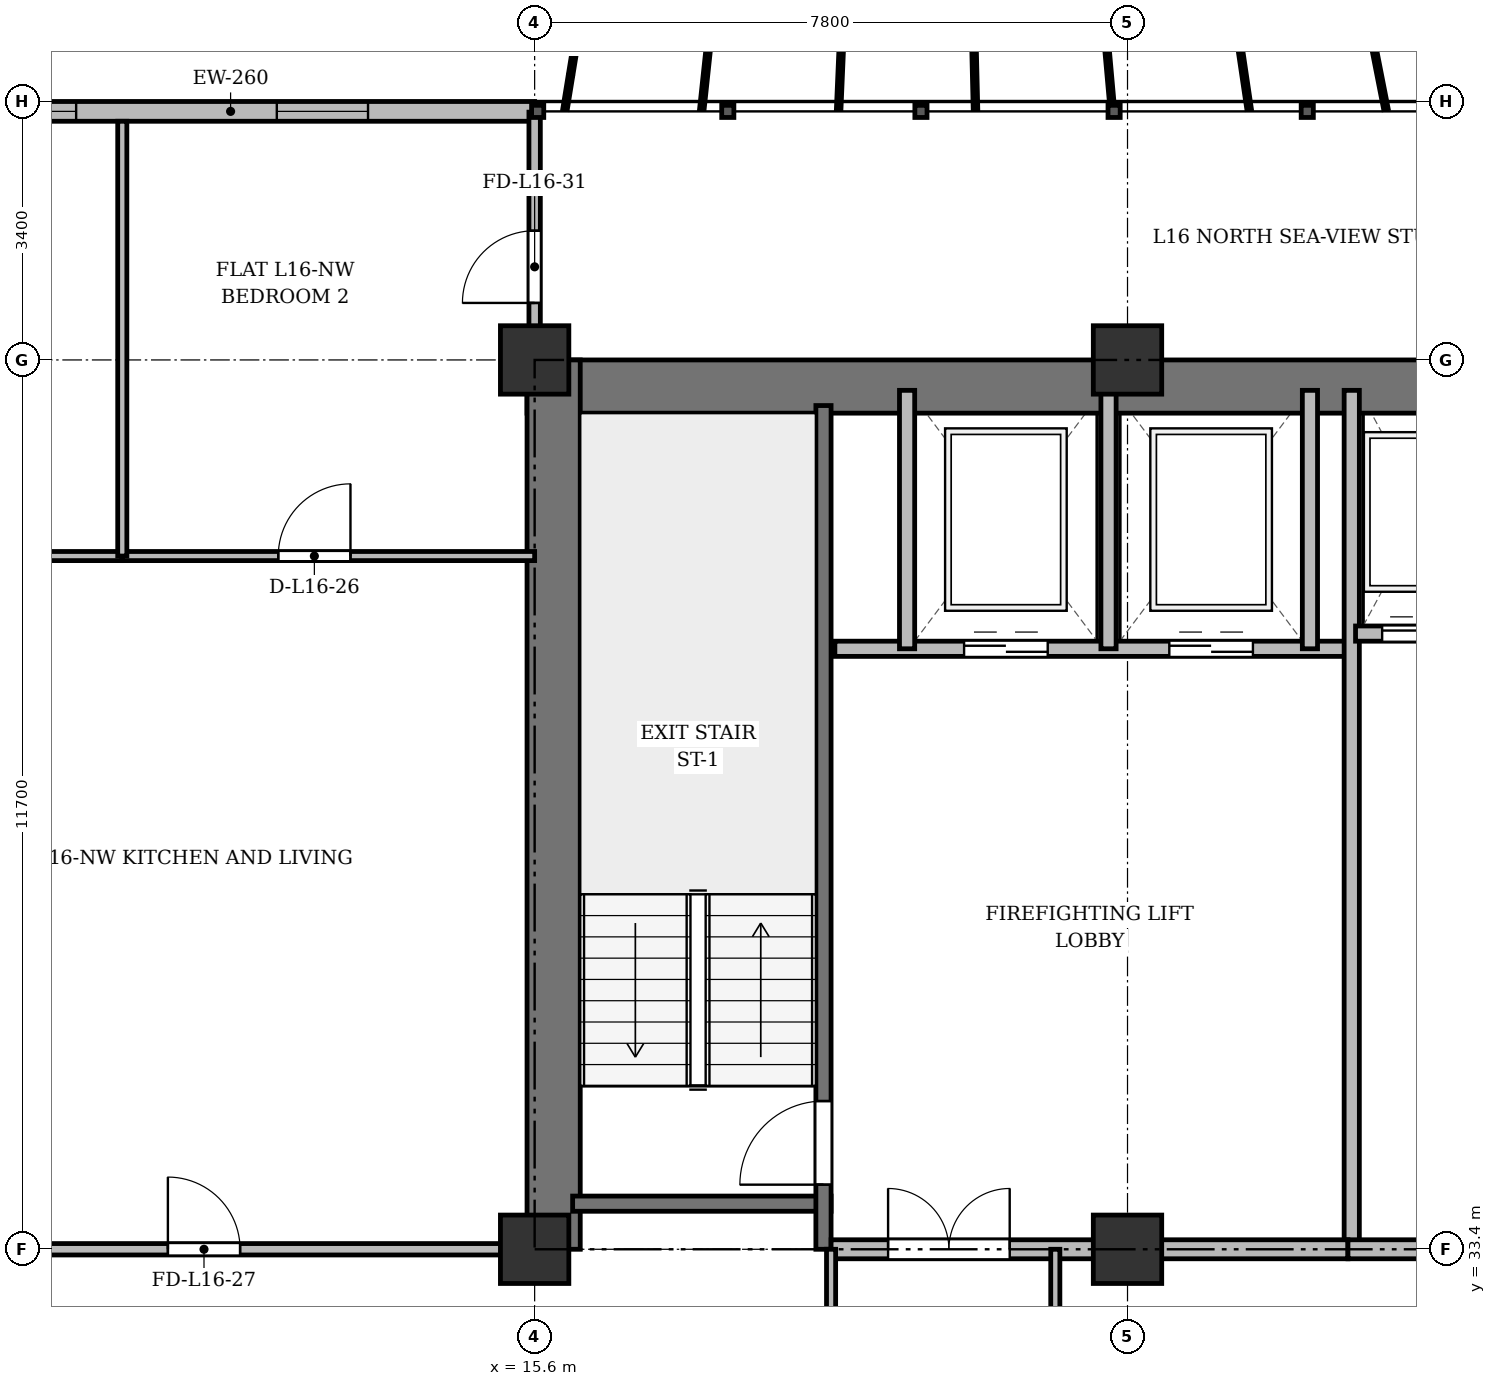
"""IFC4 building model, lengths in metres.
Left out: names, types, materials, properties, quantities, classifications, styles, units other than length and angle.
Written with IfcOpenShell. Run it as: python <this file> out.ifc"""

import sys

from ifc_helpers import new_model, si_unit, direction, frame, frame_2d, origin, origin_2d, place, context, subcontext, project, spatial, rectangle, extrude, source, transform, mapped, element, fill, save


model = new_model("IFC4")
c1 = context("Model", 3, precision=1e-05, world=origin(), true_north=direction((0.0, 1.0)))
c2 = subcontext(c1, "Body", "Model", "MODEL_VIEW")
j1 = project(units=[si_unit("LENGTHUNIT", "METRE"), si_unit("PLANEANGLEUNIT", "RADIAN")], contexts=[c1])
p1 = place(None, origin())
s1 = spatial("IfcSite", under=j1, at=p1, CompositionType="ELEMENT")
p2 = place(p1, origin())
s2 = spatial("IfcBuilding", under=s1, at=p2, CompositionType="ELEMENT")
p3 = place(p2, frame((0.0, 0.0, 63.1)))
s3 = spatial("IfcBuildingStorey", under=s2, at=p3, CompositionType="ELEMENT", Elevation=63.1)
m1 = source(origin(), c2, "Body", "SweptSolid", [
    extrude(rectangle(XDim=0.9, YDim=0.9, at=origin_2d()), origin(), (0.0, 0.0, 1.0), 3.6),
])
for number, where, z_axis, x_axis in (
    (1, (15.6, 33.4, 0.0), (0.0, 0.0, 1.0), (1.0, 0.0, 0.0)),
    (2, (15.6, 45.1, 0.0), (0.0, 0.0, 1.0), (1.0, 0.0, 0.0)),
    (3, (23.4, 33.4, 0.0), (0.0, 0.0, 1.0), (1.0, 0.0, 0.0)),
    (4, (23.4, 45.1, 0.0), (0.0, 0.0, 1.0), (1.0, 0.0, 0.0)),
):
    element("IfcColumn", number, at=place(p3, frame(where, z_axis=z_axis, x_axis=x_axis)), inside=s3, PredefinedType="COLUMN", context=c2, shape_type="MappedRepresentation", body=[
        mapped(m1, transform((0.0, 0.0, 0.0), x_axis=(1.0, 0.0, 0.0), y_axis=(0.0, 1.0, 0.0), z_axis=(0.0, 0.0, 1.0), scale=1.0)),
    ])
p4 = place(p3, frame((7.6, 48.37, 0.0), z_axis=(0.0, 0.0, 1.0), x_axis=(1.0, 0.0, 0.0)))
e5 = element("IfcWall", 5, at=p4, inside=s3, PredefinedType="SOLIDWALL", context=c2, shape_type="SweptSolid", body=[
    extrude(rectangle(XDim=8.0, YDim=0.26, at=frame_2d((4.0, 0.0))), origin(), (0.0, 0.0, 1.0), 3.34),
])
p5 = place(p4, frame((0.768, 0.0, 0.9)))
e6 = element("IfcOpeningElement", 6, at=p5, cuts=e5, PredefinedType="OPENING", context=c2, shape_type="SweptSolid", body=[
    extrude(rectangle(XDim=1.2, YDim=1.65, at=frame_2d((0.6, 0.825))), frame((0.0, 0.14, 0.0), z_axis=(0.0, -1.0, 0.0), x_axis=(1.0, 0.0, 0.0)), (0.0, 0.0, 1.0), 0.28),
])
p6 = place(p4, frame((4.608, 0.0, 0.9)))
e7 = element("IfcOpeningElement", 7, at=p6, cuts=e5, PredefinedType="OPENING", context=c2, shape_type="SweptSolid", body=[
    extrude(rectangle(XDim=1.2, YDim=1.65, at=frame_2d((0.6, 0.825))), frame((0.0, 0.14, 0.0), z_axis=(0.0, -1.0, 0.0), x_axis=(1.0, 0.0, 0.0)), (0.0, 0.0, 1.0), 0.28),
])
p7 = place(p3, frame((15.5, 44.75, 0.0), z_axis=(0.0, 0.0, 1.0), x_axis=(1.0, 0.0, 0.0)))
e8 = element("IfcWall", 8, at=p7, inside=s3, PredefinedType="SHEAR", context=c2, shape_type="SweptSolid", body=[
    extrude(rectangle(XDim=43.4, YDim=0.7, at=frame_2d((21.7, 0.0))), origin(), (0.0, 0.0, 1.0), 3.34),
])
p8 = place(p3, frame((15.85, 33.4, 0.0), z_axis=(0.0, 0.0, 1.0), x_axis=(0.0, 1.0, 0.0)))
e9 = element("IfcWall", 9, at=p8, inside=s3, PredefinedType="SHEAR", context=c2, shape_type="SweptSolid", body=[
    extrude(rectangle(XDim=11.7, YDim=0.7, at=frame_2d((5.85, 0.0))), origin(), (0.0, 0.0, 1.0), 3.34),
])
p9 = place(p3, frame((16.1, 34.0, 0.0), z_axis=(0.0, 0.0, 1.0), x_axis=(1.0, 0.0, 0.0)))
e10 = element("IfcWall", 10, at=p9, inside=s3, PredefinedType="SHEAR", context=c2, shape_type="SweptSolid", body=[
    extrude(rectangle(XDim=3.4, YDim=0.2, at=frame_2d((1.7, 0.0))), origin(), (0.0, 0.0, 1.0), 3.34),
])
p10 = place(p3, frame((19.4, 33.4, 0.0), z_axis=(0.0, 0.0, 1.0), x_axis=(0.0, 1.0, 0.0)))
e11 = element("IfcWall", 11, at=p10, inside=s3, PredefinedType="SHEAR", context=c2, shape_type="SweptSolid", body=[
    extrude(rectangle(XDim=11.1, YDim=0.2, at=frame_2d((5.55, 0.0))), origin(), (0.0, 0.0, 1.0), 3.34),
])
p11 = place(p10, frame((0.85, 0.0, 0.0)))
e12 = element("IfcOpeningElement", 12, at=p11, cuts=e11, PredefinedType="OPENING", context=c2, shape_type="SweptSolid", body=[
    extrude(rectangle(XDim=1.1, YDim=2.15, at=frame_2d((0.55, 1.075))), frame((0.0, 0.11, 0.0), z_axis=(0.0, -1.0, 0.0), x_axis=(1.0, 0.0, 0.0)), (0.0, 0.0, 1.0), 0.22),
])
p12 = place(p3, frame((19.55, 41.3, 0.0), z_axis=(0.0, 0.0, 1.0), x_axis=(1.0, 0.0, 0.0)))
e13 = element("IfcWall", 13, at=p12, inside=s3, PredefinedType="SOLIDWALL", context=c2, shape_type="SweptSolid", body=[
    extrude(rectangle(XDim=6.75, YDim=0.2, at=frame_2d((3.375, 0.0))), origin(), (0.0, 0.0, 1.0), 3.34),
])
p13 = place(p12, frame((1.7, 0.0, 0.0)))
e14 = element("IfcOpeningElement", 14, at=p13, cuts=e13, PredefinedType="OPENING", context=c2, shape_type="SweptSolid", body=[
    extrude(rectangle(XDim=1.1, YDim=2.15, at=frame_2d((0.55, 1.075))), frame((0.0, 0.11, 0.0), z_axis=(0.0, -1.0, 0.0), x_axis=(1.0, 0.0, 0.0)), (0.0, 0.0, 1.0), 0.22),
])
p14 = place(p12, frame((4.4, 0.0, 0.0)))
e15 = element("IfcOpeningElement", 15, at=p14, cuts=e13, PredefinedType="OPENING", context=c2, shape_type="SweptSolid", body=[
    extrude(rectangle(XDim=1.1, YDim=2.15, at=frame_2d((0.55, 1.075))), frame((0.0, 0.11, 0.0), z_axis=(0.0, -1.0, 0.0), x_axis=(1.0, 0.0, 0.0)), (0.0, 0.0, 1.0), 0.22),
])
for number, where, z_axis, x_axis in (
    (16, (20.5, 41.3, 0.0), (0.0, 0.0, 1.0), (0.0, 1.0, 0.0)),
    (17, (23.15, 41.3, 0.0), (0.0, 0.0, 1.0), (0.0, 1.0, 0.0)),
    (18, (25.8, 41.3, 0.0), (0.0, 0.0, 1.0), (0.0, 1.0, 0.0)),
):
    element("IfcWall", number, at=place(p3, frame(where, z_axis=z_axis, x_axis=x_axis)), inside=s3, PredefinedType="SOLIDWALL", context=c2, shape_type="SweptSolid", body=[
        extrude(rectangle(XDim=3.4, YDim=0.2, at=frame_2d((1.7, 0.0))), origin(), (0.0, 0.0, 1.0), 3.34),
    ])
p15 = place(p3, frame((26.35, 33.4, 0.0), z_axis=(0.0, 0.0, 1.0), x_axis=(0.0, 1.0, 0.0)))
e19 = element("IfcWall", 19, at=p15, inside=s3, PredefinedType="SOLIDWALL", context=c2, shape_type="SweptSolid", body=[
    extrude(rectangle(XDim=11.3, YDim=0.2, at=frame_2d((5.65, 0.0))), origin(), (0.0, 0.0, 1.0), 2.69),
])
p16 = place(p3, frame((19.5, 33.4, 0.0), z_axis=(0.0, 0.0, 1.0), x_axis=(1.0, 0.0, 0.0)))
e20 = element("IfcWall", 20, at=p16, inside=s3, PredefinedType="PARTITIONING", context=c2, shape_type="SweptSolid", body=[
    extrude(rectangle(XDim=6.8, YDim=0.25, at=frame_2d((3.4, 0.0))), origin(), (0.0, 0.0, 1.0), 2.69),
])
p17 = place(p16, frame((0.75, 0.0, 0.0)))
e21 = element("IfcOpeningElement", 21, at=p17, cuts=e20, PredefinedType="OPENING", context=c2, shape_type="SweptSolid", body=[
    extrude(rectangle(XDim=1.6, YDim=2.2, at=frame_2d((0.8, 1.1))), frame((0.0, 0.135, 0.0), z_axis=(0.0, -1.0, 0.0), x_axis=(1.0, 0.0, 0.0)), (0.0, 0.0, 1.0), 0.27),
])
p18 = place(p3, frame((26.4, 41.5, 0.0), z_axis=(0.0, 0.0, 1.0), x_axis=(1.0, 0.0, 0.0)))
e22 = element("IfcWall", 22, at=p18, inside=s3, PredefinedType="SOLIDWALL", context=c2, shape_type="SweptSolid", body=[
    extrude(rectangle(XDim=6.95, YDim=0.2, at=frame_2d((3.475, 0.0))), origin(), (0.0, 0.0, 1.0), 3.34),
])
p19 = place(p18, frame((0.35, 0.0, 0.0)))
e23 = element("IfcOpeningElement", 23, at=p19, cuts=e22, PredefinedType="OPENING", context=c2, shape_type="SweptSolid", body=[
    extrude(rectangle(XDim=1.05, YDim=2.15, at=frame_2d((0.525, 1.075))), frame((0.0, 0.11, 0.0), z_axis=(0.0, -1.0, 0.0), x_axis=(1.0, 0.0, 0.0)), (0.0, 0.0, 1.0), 0.22),
])
p20 = place(p18, frame((2.05, 0.0, 0.0)))
e24 = element("IfcOpeningElement", 24, at=p20, cuts=e22, PredefinedType="OPENING", context=c2, shape_type="SweptSolid", body=[
    extrude(rectangle(XDim=1.05, YDim=2.15, at=frame_2d((0.525, 1.075))), frame((0.0, 0.11, 0.0), z_axis=(0.0, -1.0, 0.0), x_axis=(1.0, 0.0, 0.0)), (0.0, 0.0, 1.0), 0.22),
])
p21 = place(p18, frame((3.75, 0.0, 0.0)))
e25 = element("IfcOpeningElement", 25, at=p21, cuts=e22, PredefinedType="OPENING", context=c2, shape_type="SweptSolid", body=[
    extrude(rectangle(XDim=1.05, YDim=2.15, at=frame_2d((0.525, 1.075))), frame((0.0, 0.11, 0.0), z_axis=(0.0, -1.0, 0.0), x_axis=(1.0, 0.0, 0.0)), (0.0, 0.0, 1.0), 0.22),
])
p22 = place(p18, frame((5.45, 0.0, 0.0)))
e26 = element("IfcOpeningElement", 26, at=p22, cuts=e22, PredefinedType="OPENING", context=c2, shape_type="SweptSolid", body=[
    extrude(rectangle(XDim=1.05, YDim=2.15, at=frame_2d((0.525, 1.075))), frame((0.0, 0.11, 0.0), z_axis=(0.0, -1.0, 0.0), x_axis=(1.0, 0.0, 0.0)), (0.0, 0.0, 1.0), 0.22),
])
p23 = place(p3, frame((26.3, 33.4, 0.0), z_axis=(0.0, 0.0, 1.0), x_axis=(1.0, 0.0, 0.0)))
e27 = element("IfcWall", 27, at=p23, inside=s3, PredefinedType="PARTITIONING", context=c2, shape_type="SweptSolid", body=[
    extrude(rectangle(XDim=20.85, YDim=0.25, at=frame_2d((10.425, 0.0))), origin(), (0.0, 0.0, 1.0), 2.69),
])
p24 = place(p23, frame((9.2, 0.0, 0.0)))
e28 = element("IfcOpeningElement", 28, at=p24, cuts=e27, PredefinedType="OPENING", context=c2, shape_type="SweptSolid", body=[
    extrude(rectangle(XDim=1.6, YDim=2.2, at=frame_2d((0.8, 1.1))), frame((0.0, 0.135, 0.0), z_axis=(0.0, -1.0, 0.0), x_axis=(1.0, 0.0, 0.0)), (0.0, 0.0, 1.0), 0.27),
])
for number, where, z_axis, x_axis in (
    (29, (19.5, 29.8, 0.0), (0.0, 0.0, 1.0), (0.0, 1.0, 0.0)),
    (30, (22.45, 29.8, 0.0), (0.0, 0.0, 1.0), (0.0, 1.0, 0.0)),
):
    element("IfcWall", number, at=place(p3, frame(where, z_axis=z_axis, x_axis=x_axis)), inside=s3, PredefinedType="PARTITIONING", context=c2, shape_type="SweptSolid", body=[
        extrude(rectangle(XDim=3.6, YDim=0.12, at=frame_2d((1.8, 0.0))), origin(), (0.0, 0.0, 1.0), 2.69),
    ])
p25 = place(p3, frame((4.75, 42.52, 0.0), z_axis=(0.0, 0.0, 1.0), x_axis=(1.0, 0.0, 0.0)))
e31 = element("IfcWall", 31, at=p25, inside=s3, PredefinedType="PARTITIONING", context=c2, shape_type="SweptSolid", body=[
    extrude(rectangle(XDim=5.425, YDim=0.12, at=frame_2d((2.712, 0.0))), origin(), (0.0, 0.0, 1.0), 2.752),
])
p26 = place(p25, frame((2.423, 0.0, 0.0)))
e32 = element("IfcOpeningElement", 32, at=p26, cuts=e31, PredefinedType="OPENING", context=c2, shape_type="SweptSolid", body=[
    extrude(rectangle(XDim=0.95, YDim=2.15, at=frame_2d((0.475, 1.075))), frame((0.0, 0.07, 0.0), z_axis=(0.0, -1.0, 0.0), x_axis=(1.0, 0.0, 0.0)), (0.0, 0.0, 1.0), 0.14),
])
p27 = place(p3, frame((10.175, 42.52, 0.0), z_axis=(0.0, 0.0, 1.0), x_axis=(1.0, 0.0, 0.0)))
e33 = element("IfcWall", 33, at=p27, inside=s3, PredefinedType="PARTITIONING", context=c2, shape_type="SweptSolid", body=[
    extrude(rectangle(XDim=5.425, YDim=0.12, at=frame_2d((2.712, 0.0))), origin(), (0.0, 0.0, 1.0), 2.752),
])
p28 = place(p27, frame((2.052, 0.0, 0.0)))
e34 = element("IfcOpeningElement", 34, at=p28, cuts=e33, PredefinedType="OPENING", context=c2, shape_type="SweptSolid", body=[
    extrude(rectangle(XDim=0.95, YDim=2.15, at=frame_2d((0.475, 1.075))), frame((0.0, 0.07, 0.0), z_axis=(0.0, -1.0, 0.0), x_axis=(1.0, 0.0, 0.0)), (0.0, 0.0, 1.0), 0.14),
])
p29 = place(p3, frame((10.175, 42.52, 0.0), z_axis=(0.0, 0.0, 1.0), x_axis=(0.0, 1.0, 0.0)))
e35 = element("IfcWall", 35, at=p29, inside=s3, PredefinedType="PARTITIONING", context=c2, shape_type="SweptSolid", body=[
    extrude(rectangle(XDim=5.72, YDim=0.12, at=frame_2d((2.86, 0.0))), origin(), (0.0, 0.0, 1.0), 2.69),
])
p30 = place(p3, frame((4.75, 33.4, 0.0), z_axis=(0.0, 0.0, 1.0), x_axis=(1.0, 0.0, 0.0)))
e36 = element("IfcWall", 36, at=p30, inside=s3, PredefinedType="PARTITIONING", context=c2, shape_type="SweptSolid", body=[
    extrude(rectangle(XDim=10.85, YDim=0.15, at=frame_2d((5.425, 0.0))), origin(), (0.0, 0.0, 1.0), 2.69),
])
p31 = place(p30, frame((6.025, 0.0, 0.0)))
e37 = element("IfcOpeningElement", 37, at=p31, cuts=e36, PredefinedType="OPENING", context=c2, shape_type="SweptSolid", body=[
    extrude(rectangle(XDim=0.95, YDim=2.15, at=frame_2d((0.475, 1.075))), frame((0.0, 0.085, 0.0), z_axis=(0.0, -1.0, 0.0), x_axis=(1.0, 0.0, 0.0)), (0.0, 0.0, 1.0), 0.17),
])
p32 = place(p3, frame((15.6, 44.75, 0.0), z_axis=(0.0, 0.0, 1.0), x_axis=(0.0, 1.0, 0.0)))
e38 = element("IfcWall", 38, at=p32, inside=s3, PredefinedType="PARTITIONING", context=c2, shape_type="SweptSolid", body=[
    extrude(rectangle(XDim=3.61, YDim=0.15, at=frame_2d((1.805, 0.0))), origin(), (0.0, 0.0, 1.0), 2.752),
])
p33 = place(p32, frame((1.1, 0.0, 0.0)))
e39 = element("IfcOpeningElement", 39, at=p33, cuts=e38, PredefinedType="OPENING", context=c2, shape_type="SweptSolid", body=[
    extrude(rectangle(XDim=0.95, YDim=2.15, at=frame_2d((0.475, 1.075))), frame((0.0, 0.085, 0.0), z_axis=(0.0, -1.0, 0.0), x_axis=(1.0, 0.0, 0.0)), (0.0, 0.0, 1.0), 0.17),
])
m2 = source(origin(), c2, "Body", "SweptSolid", [
    extrude(rectangle(XDim=1.2, YDim=1.65, at=frame_2d((0.6, 0.825))), frame((0.0, 0.03, 0.0), z_axis=(0.0, -1.0, 0.0), x_axis=(1.0, 0.0, 0.0)), (0.0, 0.0, 1.0), 0.06),
])
p34 = place(p5, origin())
e40 = element("IfcWindow", 40, at=p34, inside=s3, PartitioningType="SINGLE_PANEL", PredefinedType="WINDOW", context=c2, shape_type="MappedRepresentation", body=[
    mapped(m2, transform((0.0, 0.0, 0.0), x_axis=(1.0, 0.0, 0.0), y_axis=(0.0, 1.0, 0.0), z_axis=(0.0, 0.0, 1.0), scale=1.0)),
])
fill(e6, e40)
p35 = place(p6, origin())
e41 = element("IfcWindow", 41, at=p35, inside=s3, PartitioningType="SINGLE_PANEL", PredefinedType="WINDOW", context=c2, shape_type="MappedRepresentation", body=[
    mapped(m2, transform((0.0, 0.0, 0.0), x_axis=(1.0, 0.0, 0.0), y_axis=(0.0, 1.0, 0.0), z_axis=(0.0, 0.0, 1.0), scale=1.0)),
])
fill(e7, e41)
m3 = source(origin(), c2, "Body", "SweptSolid", [
    extrude(rectangle(XDim=1.1, YDim=2.15, at=frame_2d((0.55, 1.075))), frame((0.0, 0.025, 0.0), z_axis=(0.0, -1.0, 0.0), x_axis=(1.0, 0.0, 0.0)), (0.0, 0.0, 1.0), 0.05),
])
p36 = place(p11, origin())
e42 = element("IfcDoor", 42, at=p36, inside=s3, OperationType="SINGLE_SWING_LEFT", PredefinedType="DOOR", context=c2, shape_type="MappedRepresentation", body=[
    mapped(m3, transform((0.0, 0.0, 0.0), x_axis=(1.0, 0.0, 0.0), y_axis=(0.0, 1.0, 0.0), z_axis=(0.0, 0.0, 1.0), scale=1.0)),
])
fill(e12, e42)
p37 = place(p13, origin())
e43 = element("IfcDoor", 43, at=p37, inside=s3, OperationType="DOUBLE_DOOR_SLIDING", PredefinedType="DOOR", context=c2, shape_type="MappedRepresentation", body=[
    mapped(m3, transform((0.0, 0.0, 0.0), x_axis=(1.0, 0.0, 0.0), y_axis=(0.0, 1.0, 0.0), z_axis=(0.0, 0.0, 1.0), scale=1.0)),
])
fill(e14, e43)
p38 = place(p14, origin())
e44 = element("IfcDoor", 44, at=p38, inside=s3, OperationType="DOUBLE_DOOR_SLIDING", PredefinedType="DOOR", context=c2, shape_type="MappedRepresentation", body=[
    mapped(m3, transform((0.0, 0.0, 0.0), x_axis=(1.0, 0.0, 0.0), y_axis=(0.0, 1.0, 0.0), z_axis=(0.0, 0.0, 1.0), scale=1.0)),
])
fill(e15, e44)
m4 = source(origin(), c2, "Body", "SweptSolid", [
    extrude(rectangle(XDim=1.6, YDim=2.2, at=frame_2d((0.8, 1.1))), frame((0.0, 0.025, 0.0), z_axis=(0.0, -1.0, 0.0), x_axis=(1.0, 0.0, 0.0)), (0.0, 0.0, 1.0), 0.05),
])
p39 = place(p17, origin())
e45 = element("IfcDoor", 45, at=p39, inside=s3, OperationType="DOUBLE_DOOR_SINGLE_SWING", PredefinedType="DOOR", context=c2, shape_type="MappedRepresentation", body=[
    mapped(m4, transform((0.0, 0.0, 0.0), x_axis=(1.0, 0.0, 0.0), y_axis=(0.0, 1.0, 0.0), z_axis=(0.0, 0.0, 1.0), scale=1.0)),
])
fill(e21, e45)
m5 = source(origin(), c2, "Body", "SweptSolid", [
    extrude(rectangle(XDim=1.05, YDim=2.15, at=frame_2d((0.525, 1.075))), frame((0.0, 0.025, 0.0), z_axis=(0.0, -1.0, 0.0), x_axis=(1.0, 0.0, 0.0)), (0.0, 0.0, 1.0), 0.05),
])
p40 = place(p19, origin())
e46 = element("IfcDoor", 46, at=p40, inside=s3, OperationType="DOUBLE_DOOR_SLIDING", PredefinedType="DOOR", context=c2, shape_type="MappedRepresentation", body=[
    mapped(m5, transform((0.0, 0.0, 0.0), x_axis=(1.0, 0.0, 0.0), y_axis=(0.0, 1.0, 0.0), z_axis=(0.0, 0.0, 1.0), scale=1.0)),
])
fill(e23, e46)
m6 = source(origin(), c2, "Body", "SweptSolid", [
    extrude(rectangle(XDim=0.95, YDim=2.15, at=frame_2d((0.475, 1.075))), frame((0.0, 0.025, 0.0), z_axis=(0.0, -1.0, 0.0), x_axis=(1.0, 0.0, 0.0)), (0.0, 0.0, 1.0), 0.05),
])
p41 = place(p28, origin())
e47 = element("IfcDoor", 47, at=p41, inside=s3, OperationType="SINGLE_SWING_RIGHT", PredefinedType="DOOR", context=c2, shape_type="MappedRepresentation", body=[
    mapped(m6, transform((0.0, 0.0, 0.0), x_axis=(1.0, 0.0, 0.0), y_axis=(0.0, 1.0, 0.0), z_axis=(0.0, 0.0, 1.0), scale=1.0)),
])
fill(e34, e47)
p42 = place(p31, origin())
e48 = element("IfcDoor", 48, at=p42, inside=s3, OperationType="SINGLE_SWING_LEFT", PredefinedType="DOOR", context=c2, shape_type="MappedRepresentation", body=[
    mapped(m6, transform((0.0, 0.0, 0.0), x_axis=(1.0, 0.0, 0.0), y_axis=(0.0, 1.0, 0.0), z_axis=(0.0, 0.0, 1.0), scale=1.0)),
])
fill(e37, e48)
p43 = place(p33, origin())
e49 = element("IfcDoor", 49, at=p43, inside=s3, OperationType="SINGLE_SWING_LEFT", PredefinedType="DOOR", context=c2, shape_type="MappedRepresentation", body=[
    mapped(m6, transform((0.0, 0.0, 0.0), x_axis=(1.0, 0.0, 0.0), y_axis=(0.0, 1.0, 0.0), z_axis=(0.0, 0.0, 1.0), scale=1.0)),
])
fill(e39, e49)
save(model, sys.argv[1])
